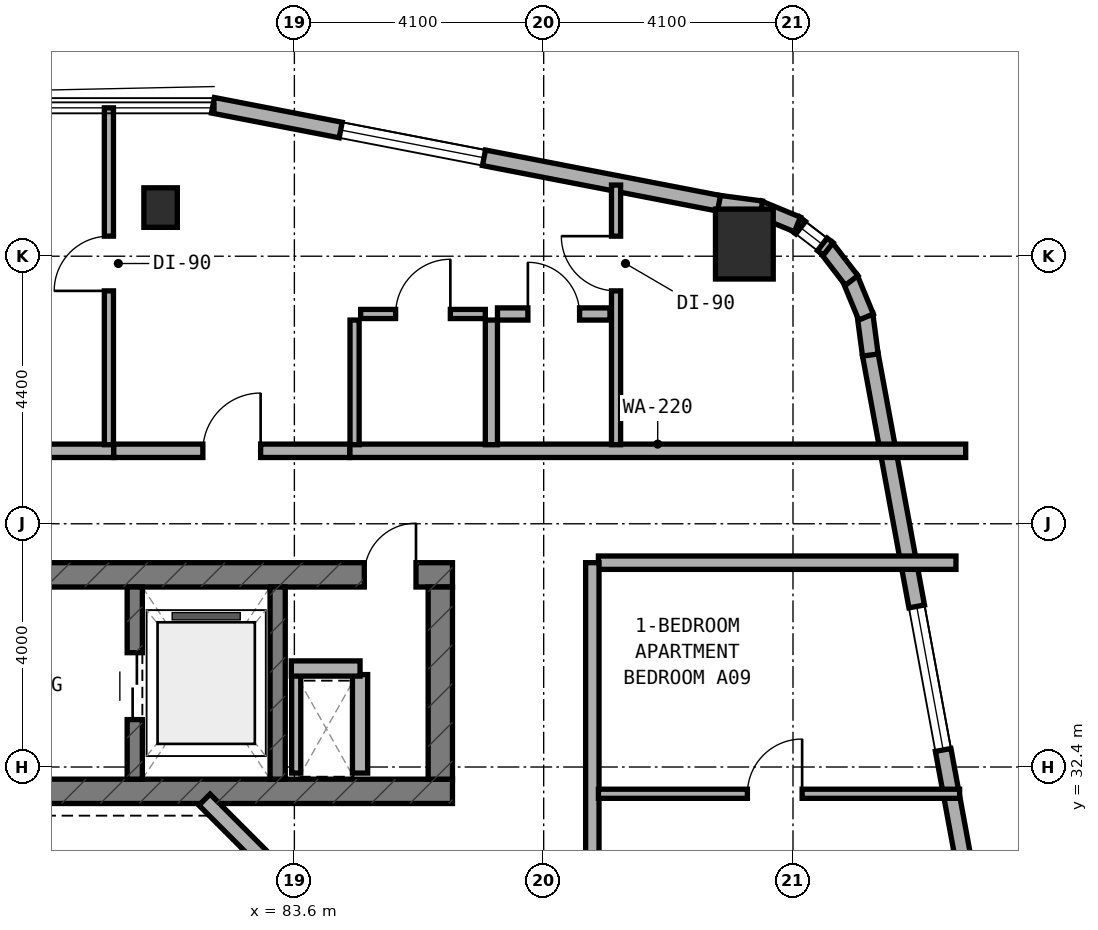
"""IFC4 building model, lengths in metres.
Left out: names, types, materials, properties, quantities, classifications, styles, units other than length and angle.
Written with IfcOpenShell. Run it as: python <this file> out.ifc"""

import sys

from ifc_helpers import new_model, si_unit, direction, frame, frame_2d, origin, origin_2d, place, context, subcontext, project, spatial, rectangle, extrude, element, fill, save


model = new_model("IFC4")
c1 = context("Model", 3, precision=1e-05, world=origin(), true_north=direction((0.0, 1.0)))
c2 = subcontext(c1, "Body", "Model", "MODEL_VIEW")
j1 = project(units=[si_unit("LENGTHUNIT", "METRE"), si_unit("PLANEANGLEUNIT", "RADIAN")], contexts=[c1])
p1 = place(None, origin())
s1 = spatial("IfcSite", under=j1, at=p1, CompositionType="ELEMENT")
p2 = place(p1, origin())
s2 = spatial("IfcBuilding", under=s1, at=p2, CompositionType="ELEMENT")
p3 = place(p2, frame((0.0, 0.0, 109.0)))
s3 = spatial("IfcBuildingStorey", under=s2, at=p3, CompositionType="ELEMENT", Elevation=109.0)
p4 = place(p3, frame((68.0, 32.0, 0.0), z_axis=(0.0, 0.0, 1.0), x_axis=(1.0, 0.0, 0.0)))
e1 = element("IfcWall", 1, at=p4, inside=s3, PredefinedType="SHEAR", context=c2, shape_type="SweptSolid", body=[
    extrude(rectangle(XDim=18.2, YDim=0.4, at=frame_2d((9.1, 0.0))), origin(), (0.0, 0.0, 1.0), 3.5),
])
p5 = place(p3, frame((68.0, 35.56, 0.0), z_axis=(0.0, 0.0, 1.0), x_axis=(1.0, 0.0, 0.0)))
e2 = element("IfcWall", 2, at=p5, inside=s3, PredefinedType="SHEAR", context=c2, shape_type="SweptSolid", body=[
    extrude(rectangle(XDim=18.2, YDim=0.4, at=frame_2d((9.1, 0.0))), origin(), (0.0, 0.0, 1.0), 3.5),
])
p6 = place(p5, frame((9.15, 0.0, 0.0)))
e3 = element("IfcOpeningElement", 3, at=p6, cuts=e2, PredefinedType="OPENING", context=c2, shape_type="SweptSolid", body=[
    extrude(rectangle(XDim=1.2, YDim=2.15, at=frame_2d((0.6, 1.075))), frame((0.0, 0.21, 0.0), z_axis=(0.0, -1.0, 0.0), x_axis=(1.0, 0.0, 0.0)), (0.0, 0.0, 1.0), 0.42),
])
p7 = place(p5, frame((16.75, 0.0, 0.0)))
e4 = element("IfcOpeningElement", 4, at=p7, cuts=e2, PredefinedType="OPENING", context=c2, shape_type="SweptSolid", body=[
    extrude(rectangle(XDim=0.85, YDim=2.1, at=frame_2d((0.425, 1.05))), frame((0.0, 0.21, 0.0), z_axis=(0.0, -1.0, 0.0), x_axis=(1.0, 0.0, 0.0)), (0.0, 0.0, 1.0), 0.42),
])
p8 = place(p3, frame((86.0, 32.2, 0.0), z_axis=(0.0, 0.0, 1.0), x_axis=(0.0, 1.0, 0.0)))
e5 = element("IfcWall", 5, at=p8, inside=s3, PredefinedType="SHEAR", context=c2, shape_type="SweptSolid", body=[
    extrude(rectangle(XDim=3.16, YDim=0.4, at=frame_2d((1.58, 0.0))), origin(), (0.0, 0.0, 1.0), 3.5),
])
p9 = place(p3, frame((80.975, 32.2, 0.0), z_axis=(0.0, 0.0, 1.0), x_axis=(0.0, 1.0, 0.0)))
e6 = element("IfcWall", 6, at=p9, inside=s3, PredefinedType="STANDARD", context=c2, shape_type="SweptSolid", body=[
    extrude(rectangle(XDim=3.16, YDim=0.25, at=frame_2d((1.58, 0.0))), origin(), (0.0, 0.0, 1.0), 3.25),
])
p10 = place(p9, frame((0.98, 0.0, 0.0)))
e7 = element("IfcOpeningElement", 7, at=p10, cuts=e6, PredefinedType="OPENING", context=c2, shape_type="SweptSolid", body=[
    extrude(rectangle(XDim=1.1, YDim=2.15, at=frame_2d((0.55, 1.075))), frame((0.0, 0.135, 0.0), z_axis=(0.0, -1.0, 0.0), x_axis=(1.0, 0.0, 0.0)), (0.0, 0.0, 1.0), 0.27),
])
p11 = place(p3, frame((83.325, 32.2, 0.0), z_axis=(0.0, 0.0, 1.0), x_axis=(0.0, 1.0, 0.0)))
e8 = element("IfcWall", 8, at=p11, inside=s3, PredefinedType="STANDARD", context=c2, shape_type="SweptSolid", body=[
    extrude(rectangle(XDim=3.16, YDim=0.25, at=frame_2d((1.58, 0.0))), origin(), (0.0, 0.0, 1.0), 3.25),
])
p12 = place(p3, frame((81.4, 41.6, 0.0), z_axis=(0.0, 0.0, 1.0), x_axis=(1.0, 0.0, 0.0)))
e9 = element("IfcColumn", 9, at=p12, inside=s3, PredefinedType="COLUMN", context=c2, shape_type="SweptSolid", body=[
    extrude(rectangle(XDim=0.55, YDim=0.65, at=origin_2d()), origin(), (0.0, 0.0, 1.0), 3.5),
])
p13 = place(p3, frame((91.0, 41.0, 0.0), z_axis=(0.0, 0.0, 1.0), x_axis=(1.0, 0.0, 0.0)))
e10 = element("IfcColumn", 10, at=p13, inside=s3, PredefinedType="COLUMN", context=c2, shape_type="SweptSolid", body=[
    extrude(rectangle(XDim=0.95, YDim=1.15, at=origin_2d()), origin(), (0.0, 0.0, 1.0), 3.5),
])
p14 = place(p3, frame((94.682, 30.442, 0.0), z_axis=(0.0, 0.0, 1.0), x_axis=(-0.181209963057, 0.983444431215, 0.0)))
e11 = element("IfcWall", 11, at=p14, inside=s3, PredefinedType="STANDARD", context=c2, shape_type="SweptSolid", body=[
    extrude(rectangle(XDim=8.889, YDim=0.26, at=frame_2d((4.445, 0.0))), origin(), (0.0, 0.0, 1.0), 3.25),
])
p15 = place(p14, frame((2.276, 0.0, 0.8)))
e12 = element("IfcOpeningElement", 12, at=p15, cuts=e11, PredefinedType="OPENING", context=c2, shape_type="SweptSolid", body=[
    extrude(rectangle(XDim=2.4, YDim=1.6, at=frame_2d((1.2, 0.8))), frame((0.0, 0.14, 0.0), z_axis=(0.0, -1.0, 0.0), x_axis=(1.0, 0.0, 0.0)), (0.0, 0.0, 1.0), 0.28),
])
p16 = place(p3, frame((93.072, 39.175, 0.0), z_axis=(0.0, 0.0, 1.0), x_axis=(-0.131667498923, 0.991293937098, 0.0)))
e13 = element("IfcWall", 13, at=p16, inside=s3, PredefinedType="STANDARD", context=c2, shape_type="SweptSolid", body=[
    extrude(rectangle(XDim=0.677, YDim=0.26, at=frame_2d((0.338, 0.0))), origin(), (0.0, 0.0, 1.0), 3.25),
])
p17 = place(p3, frame((93.001, 39.8, 0.0), z_axis=(0.0, 0.0, 1.0), x_axis=(-0.381988976935, 0.924166879681, 0.0)))
e14 = element("IfcWall", 14, at=p17, inside=s3, PredefinedType="STANDARD", context=c2, shape_type="SweptSolid", body=[
    extrude(rectangle(XDim=0.693, YDim=0.26, at=frame_2d((0.347, 0.0))), origin(), (0.0, 0.0, 1.0), 3.25),
])
p18 = place(p3, frame((92.764, 40.401, 0.0), z_axis=(0.0, 0.0, 1.0), x_axis=(-0.609472651958, 0.792807092876, 0.0)))
e15 = element("IfcWall", 15, at=p18, inside=s3, PredefinedType="STANDARD", context=c2, shape_type="SweptSolid", body=[
    extrude(rectangle(XDim=0.694, YDim=0.26, at=frame_2d((0.347, 0.0))), origin(), (0.0, 0.0, 1.0), 3.25),
])
p19 = place(p3, frame((92.379, 40.92, 0.0), z_axis=(0.0, 0.0, 1.0), x_axis=(-0.792506234191, 0.609863811657, 0.0)))
e16 = element("IfcWall", 16, at=p19, inside=s3, PredefinedType="STANDARD", context=c2, shape_type="SweptSolid", body=[
    extrude(rectangle(XDim=0.694, YDim=0.26, at=frame_2d((0.347, 0.0))), origin(), (0.0, 0.0, 1.0), 3.25),
])
p20 = place(p19, frame((0.122, 0.0, 0.85)))
e17 = element("IfcOpeningElement", 17, at=p20, cuts=e16, PredefinedType="OPENING", context=c2, shape_type="SweptSolid", body=[
    extrude(rectangle(XDim=0.45, YDim=1.5, at=frame_2d((0.225, 0.75))), frame((0.0, 0.14, 0.0), z_axis=(0.0, -1.0, 0.0), x_axis=(1.0, 0.0, 0.0)), (0.0, 0.0, 1.0), 0.28),
])
p21 = place(p3, frame((91.873, 41.322, 0.0), z_axis=(0.0, 0.0, 1.0), x_axis=(-0.92421822618, 0.381864727877, 0.0)))
e18 = element("IfcWall", 18, at=p21, inside=s3, PredefinedType="STANDARD", context=c2, shape_type="SweptSolid", body=[
    extrude(rectangle(XDim=0.694, YDim=0.26, at=frame_2d((0.347, 0.0))), origin(), (0.0, 0.0, 1.0), 3.25),
])
p22 = place(p3, frame((91.281, 41.579, 0.0), z_axis=(0.0, 0.0, 1.0), x_axis=(-0.991433279471, 0.130614135366, 0.0)))
e19 = element("IfcWall", 19, at=p22, inside=s3, PredefinedType="STANDARD", context=c2, shape_type="SweptSolid", body=[
    extrude(rectangle(XDim=0.712, YDim=0.26, at=frame_2d((0.356, 0.0))), origin(), (0.0, 0.0, 1.0), 3.25),
])
p23 = place(p3, frame((90.583, 41.67, 0.0), z_axis=(0.0, 0.0, 1.0), x_axis=(-0.981750199588, 0.190175039396, 0.0)))
e20 = element("IfcWall", 20, at=p23, inside=s3, PredefinedType="STANDARD", context=c2, shape_type="SweptSolid", body=[
    extrude(rectangle(XDim=8.477, YDim=0.26, at=frame_2d((4.238, 0.0))), origin(), (0.0, 0.0, 1.0), 3.25),
])
p24 = place(p23, frame((3.937, 0.0, 0.8)))
e21 = element("IfcOpeningElement", 21, at=p24, cuts=e20, PredefinedType="OPENING", context=c2, shape_type="SweptSolid", body=[
    extrude(rectangle(XDim=2.4, YDim=1.6, at=frame_2d((1.2, 0.8))), frame((0.0, 0.14, 0.0), z_axis=(0.0, -1.0, 0.0), x_axis=(1.0, 0.0, 0.0)), (0.0, 0.0, 1.0), 0.28),
])
p25 = place(p3, frame((83.756, 30.228, 0.0), z_axis=(0.0, 0.0, 1.0), x_axis=(-0.707106781187, 0.707106781187, 0.0)))
e22 = element("IfcWall", 22, at=p25, inside=s3, PredefinedType="STANDARD", context=c2, shape_type="SweptSolid", body=[
    extrude(rectangle(XDim=2.311, YDim=0.26, at=frame_2d((1.155, 0.0))), origin(), (0.0, 0.0, 1.0), 3.25),
])
p26 = place(p3, frame((83.63, 32.3, 0.0), z_axis=(0.0, 0.0, 1.0), x_axis=(0.0, 1.0, 0.0)))
e23 = element("IfcWall", 23, at=p26, inside=s3, PredefinedType="PARTITIONING", context=c2, shape_type="SweptSolid", body=[
    extrude(rectangle(XDim=1.62, YDim=0.15, at=frame_2d((0.81, 0.0))), origin(), (0.0, 0.0, 1.0), 2.825),
])
p27 = place(p3, frame((84.68, 32.3, 0.0), z_axis=(0.0, 0.0, 1.0), x_axis=(0.0, 1.0, 0.0)))
e24 = element("IfcWall", 24, at=p27, inside=s3, PredefinedType="SOLIDWALL", context=c2, shape_type="SweptSolid", body=[
    extrude(rectangle(XDim=1.62, YDim=0.25, at=frame_2d((0.81, 0.0))), origin(), (0.0, 0.0, 1.0), 3.22),
])
p28 = place(p3, frame((83.55, 34.02, 0.0), z_axis=(0.0, 0.0, 1.0), x_axis=(1.0, 0.0, 0.0)))
e25 = element("IfcWall", 25, at=p28, inside=s3, PredefinedType="SOLIDWALL", context=c2, shape_type="SweptSolid", body=[
    extrude(rectangle(XDim=1.13, YDim=0.25, at=frame_2d((0.565, 0.0))), origin(), (0.0, 0.0, 1.0), 3.22),
])
p29 = place(p3, frame((74.8, 37.6, 0.0), z_axis=(0.0, 0.0, 1.0), x_axis=(1.0, 0.0, 0.0)))
e26 = element("IfcWall", 26, at=p29, inside=s3, PredefinedType="SOLIDWALL", context=c2, shape_type="SweptSolid", body=[
    extrude(rectangle(XDim=5.83, YDim=0.22, at=frame_2d((2.915, 0.0))), origin(), (0.0, 0.0, 1.0), 3.22),
])
p30 = place(p3, frame((84.51, 37.6, 0.0), z_axis=(0.0, 0.0, 1.0), x_axis=(1.0, 0.0, 0.0)))
e27 = element("IfcWall", 27, at=p30, inside=s3, PredefinedType="SOLIDWALL", context=c2, shape_type="SweptSolid", body=[
    extrude(rectangle(XDim=10.13, YDim=0.22, at=frame_2d((5.065, 0.0))), origin(), (0.0, 0.0, 1.0), 2.945),
])
p31 = place(p3, frame((80.63, 37.6, 0.0), z_axis=(0.0, 0.0, 1.0), x_axis=(1.0, 0.0, 0.0)))
e28 = element("IfcWall", 28, at=p31, inside=s3, PredefinedType="SOLIDWALL", context=c2, shape_type="SweptSolid", body=[
    extrude(rectangle(XDim=3.88, YDim=0.22, at=frame_2d((1.94, 0.0))), origin(), (0.0, 0.0, 1.0), 2.825),
])
p32 = place(p31, frame((1.465, 0.0, 0.0)))
e29 = element("IfcOpeningElement", 29, at=p32, cuts=e28, PredefinedType="OPENING", context=c2, shape_type="SweptSolid", body=[
    extrude(rectangle(XDim=0.95, YDim=2.1, at=frame_2d((0.475, 1.05))), frame((0.0, 0.12, 0.0), z_axis=(0.0, -1.0, 0.0), x_axis=(1.0, 0.0, 0.0)), (0.0, 0.0, 1.0), 0.24),
])
p33 = place(p3, frame((80.55, 37.7, 0.0), z_axis=(0.0, 0.0, 1.0), x_axis=(0.0, 1.0, 0.0)))
e30 = element("IfcWall", 30, at=p33, inside=s3, PredefinedType="PARTITIONING", context=c2, shape_type="SweptSolid", body=[
    extrude(rectangle(XDim=5.54, YDim=0.15, at=frame_2d((2.77, 0.0))), origin(), (0.0, 0.0, 1.0), 2.865),
])
p34 = place(p33, frame((2.53, 0.0, 0.0)))
e31 = element("IfcOpeningElement", 31, at=p34, cuts=e30, PredefinedType="OPENING", context=c2, shape_type="SweptSolid", body=[
    extrude(rectangle(XDim=0.9, YDim=2.1, at=frame_2d((0.45, 1.05))), frame((0.0, 0.085, 0.0), z_axis=(0.0, -1.0, 0.0), x_axis=(1.0, 0.0, 0.0)), (0.0, 0.0, 1.0), 0.17),
])
p35 = place(p3, frame((88.89, 37.7, 0.0), z_axis=(0.0, 0.0, 1.0), x_axis=(0.0, 1.0, 0.0)))
e32 = element("IfcWall", 32, at=p35, inside=s3, PredefinedType="PARTITIONING", context=c2, shape_type="SweptSolid", body=[
    extrude(rectangle(XDim=4.27, YDim=0.15, at=frame_2d((2.135, 0.0))), origin(), (0.0, 0.0, 1.0), 2.945),
])
p36 = place(p35, frame((2.53, 0.0, 0.0)))
e33 = element("IfcOpeningElement", 33, at=p36, cuts=e32, PredefinedType="OPENING", context=c2, shape_type="SweptSolid", body=[
    extrude(rectangle(XDim=0.9, YDim=2.1, at=frame_2d((0.45, 1.05))), frame((0.0, 0.085, 0.0), z_axis=(0.0, -1.0, 0.0), x_axis=(1.0, 0.0, 0.0)), (0.0, 0.0, 1.0), 0.17),
])
p37 = place(p3, frame((86.84, 37.7, 0.0), z_axis=(0.0, 0.0, 1.0), x_axis=(0.0, 1.0, 0.0)))
e34 = element("IfcWall", 34, at=p37, inside=s3, PredefinedType="PLUMBINGWALL", context=c2, shape_type="SweptSolid", body=[
    extrude(rectangle(XDim=2.05, YDim=0.2, at=frame_2d((1.025, 0.0))), origin(), (0.0, 0.0, 1.0), 3.22),
])
p38 = place(p3, frame((84.59, 37.7, 0.0), z_axis=(0.0, 0.0, 1.0), x_axis=(0.0, 1.0, 0.0)))
e35 = element("IfcWall", 35, at=p38, inside=s3, PredefinedType="PARTITIONING", context=c2, shape_type="SweptSolid", body=[
    extrude(rectangle(XDim=2.05, YDim=0.15, at=frame_2d((1.025, 0.0))), origin(), (0.0, 0.0, 1.0), 3.22),
])
p39 = place(p3, frame((86.94, 39.85, 0.0), z_axis=(0.0, 0.0, 1.0), x_axis=(1.0, 0.0, 0.0)))
e36 = element("IfcWall", 36, at=p39, inside=s3, PredefinedType="PLUMBINGWALL", context=c2, shape_type="SweptSolid", body=[
    extrude(rectangle(XDim=1.85, YDim=0.2, at=frame_2d((0.925, 0.0))), origin(), (0.0, 0.0, 1.0), 3.22),
])
p40 = place(p39, frame((0.5, 0.0, 0.0)))
e37 = element("IfcOpeningElement", 37, at=p40, cuts=e36, PredefinedType="OPENING", context=c2, shape_type="SweptSolid", body=[
    extrude(rectangle(XDim=0.85, YDim=2.1, at=frame_2d((0.425, 1.05))), frame((0.0, 0.11, 0.0), z_axis=(0.0, -1.0, 0.0), x_axis=(1.0, 0.0, 0.0)), (0.0, 0.0, 1.0), 0.22),
])
p41 = place(p3, frame((84.69, 39.85, 0.0), z_axis=(0.0, 0.0, 1.0), x_axis=(1.0, 0.0, 0.0)))
e38 = element("IfcWall", 38, at=p41, inside=s3, PredefinedType="PARTITIONING", context=c2, shape_type="SweptSolid", body=[
    extrude(rectangle(XDim=2.05, YDim=0.15, at=frame_2d((1.025, 0.0))), origin(), (0.0, 0.0, 1.0), 3.22),
])
p42 = place(p41, frame((0.575, 0.0, 0.0)))
e39 = element("IfcOpeningElement", 39, at=p42, cuts=e38, PredefinedType="OPENING", context=c2, shape_type="SweptSolid", body=[
    extrude(rectangle(XDim=0.9, YDim=2.1, at=frame_2d((0.45, 1.05))), frame((0.0, 0.085, 0.0), z_axis=(0.0, -1.0, 0.0), x_axis=(1.0, 0.0, 0.0)), (0.0, 0.0, 1.0), 0.17),
])
p43 = place(p3, frame((88.6, 35.76, 0.0), z_axis=(0.0, 0.0, 1.0), x_axis=(1.0, 0.0, 0.0)))
e40 = element("IfcWall", 40, at=p43, inside=s3, PredefinedType="SOLIDWALL", context=c2, shape_type="SweptSolid", body=[
    extrude(rectangle(XDim=5.88, YDim=0.22, at=frame_2d((2.94, 0.0))), origin(), (0.0, 0.0, 1.0), 2.945),
])
p44 = place(p3, frame((88.5, 26.4, 0.0), z_axis=(0.0, 0.0, 1.0), x_axis=(0.0, 1.0, 0.0)))
e41 = element("IfcWall", 41, at=p44, inside=s3, PredefinedType="SOLIDWALL", context=c2, shape_type="SweptSolid", body=[
    extrude(rectangle(XDim=9.36, YDim=0.22, at=frame_2d((4.68, 0.0))), origin(), (0.0, 0.0, 1.0), 2.825),
])
p45 = place(p44, frame((2.305, 0.0, 0.0)))
e42 = element("IfcOpeningElement", 42, at=p45, cuts=e41, PredefinedType="OPENING", context=c2, shape_type="SweptSolid", body=[
    extrude(rectangle(XDim=0.95, YDim=2.1, at=frame_2d((0.475, 1.05))), frame((0.0, 0.12, 0.0), z_axis=(0.0, -1.0, 0.0), x_axis=(1.0, 0.0, 0.0)), (0.0, 0.0, 1.0), 0.24),
])
p46 = place(p3, frame((88.6, 31.96, 0.0), z_axis=(0.0, 0.0, 1.0), x_axis=(1.0, 0.0, 0.0)))
e43 = element("IfcWall", 43, at=p46, inside=s3, PredefinedType="PARTITIONING", context=c2, shape_type="SweptSolid", body=[
    extrude(rectangle(XDim=5.94, YDim=0.15, at=frame_2d((2.97, 0.0))), origin(), (0.0, 0.0, 1.0), 2.945),
])
p47 = place(p46, frame((2.45, 0.0, 0.0)))
e44 = element("IfcOpeningElement", 44, at=p47, cuts=e43, PredefinedType="OPENING", context=c2, shape_type="SweptSolid", body=[
    extrude(rectangle(XDim=0.9, YDim=2.1, at=frame_2d((0.45, 1.05))), frame((0.0, 0.085, 0.0), z_axis=(0.0, -1.0, 0.0), x_axis=(1.0, 0.0, 0.0)), (0.0, 0.0, 1.0), 0.17),
])
p48 = place(p15, origin())
e45 = element("IfcWindow", 45, at=p48, inside=s3, PartitioningType="SINGLE_PANEL", PredefinedType="WINDOW", context=c2, shape_type="SweptSolid", body=[
    extrude(rectangle(XDim=2.4, YDim=1.6, at=frame_2d((1.2, 0.8))), frame((0.0, 0.03, 0.0), z_axis=(0.0, -1.0, 0.0), x_axis=(1.0, 0.0, 0.0)), (0.0, 0.0, 1.0), 0.06),
])
fill(e12, e45)
p49 = place(p24, origin())
e46 = element("IfcWindow", 46, at=p49, inside=s3, PartitioningType="SINGLE_PANEL", PredefinedType="WINDOW", context=c2, shape_type="SweptSolid", body=[
    extrude(rectangle(XDim=2.4, YDim=1.6, at=frame_2d((1.2, 0.8))), frame((0.0, 0.03, 0.0), z_axis=(0.0, -1.0, 0.0), x_axis=(1.0, 0.0, 0.0)), (0.0, 0.0, 1.0), 0.06),
])
fill(e21, e46)
p50 = place(p20, origin())
e47 = element("IfcWindow", 47, at=p50, inside=s3, PartitioningType="SINGLE_PANEL", PredefinedType="WINDOW", context=c2, shape_type="SweptSolid", body=[
    extrude(rectangle(XDim=0.45, YDim=1.5, at=frame_2d((0.225, 0.75))), frame((0.0, 0.03, 0.0), z_axis=(0.0, -1.0, 0.0), x_axis=(1.0, 0.0, 0.0)), (0.0, 0.0, 1.0), 0.06),
])
fill(e17, e47)
p51 = place(p10, origin())
e48 = element("IfcDoor", 48, at=p51, inside=s3, OperationType="DOUBLE_DOOR_SLIDING", PredefinedType="DOOR", context=c2, shape_type="SweptSolid", body=[
    extrude(rectangle(XDim=1.1, YDim=2.15, at=frame_2d((0.55, 1.075))), frame((0.0, 0.025, 0.0), z_axis=(0.0, -1.0, 0.0), x_axis=(1.0, 0.0, 0.0)), (0.0, 0.0, 1.0), 0.05),
])
fill(e7, e48)
p52 = place(p7, origin())
e49 = element("IfcDoor", 49, at=p52, inside=s3, OperationType="SINGLE_SWING_RIGHT", PredefinedType="DOOR", context=c2, shape_type="SweptSolid", body=[
    extrude(rectangle(XDim=0.85, YDim=2.1, at=frame_2d((0.425, 1.05))), frame((0.0, 0.025, 0.0), z_axis=(0.0, -1.0, 0.0), x_axis=(1.0, 0.0, 0.0)), (0.0, 0.0, 1.0), 0.05),
])
fill(e4, e49)
p53 = place(p32, origin())
e50 = element("IfcDoor", 50, at=p53, inside=s3, OperationType="SINGLE_SWING_RIGHT", PredefinedType="DOOR", context=c2, shape_type="SweptSolid", body=[
    extrude(rectangle(XDim=0.95, YDim=2.1, at=frame_2d((0.475, 1.05))), frame((0.0, 0.025, 0.0), z_axis=(0.0, -1.0, 0.0), x_axis=(1.0, 0.0, 0.0)), (0.0, 0.0, 1.0), 0.05),
])
fill(e29, e50)
p54 = place(p34, origin())
e51 = element("IfcDoor", 51, at=p54, inside=s3, OperationType="SINGLE_SWING_LEFT", PredefinedType="DOOR", context=c2, shape_type="SweptSolid", body=[
    extrude(rectangle(XDim=0.9, YDim=2.1, at=frame_2d((0.45, 1.05))), frame((0.0, 0.025, 0.0), z_axis=(0.0, -1.0, 0.0), x_axis=(1.0, 0.0, 0.0)), (0.0, 0.0, 1.0), 0.05),
])
fill(e31, e51)
p55 = place(p36, origin())
e52 = element("IfcDoor", 52, at=p55, inside=s3, OperationType="SINGLE_SWING_RIGHT", PredefinedType="DOOR", context=c2, shape_type="SweptSolid", body=[
    extrude(rectangle(XDim=0.9, YDim=2.1, at=frame_2d((0.45, 1.05))), frame((0.0, 0.025, 0.0), z_axis=(0.0, -1.0, 0.0), x_axis=(1.0, 0.0, 0.0)), (0.0, 0.0, 1.0), 0.05),
])
fill(e33, e52)
p56 = place(p40, origin())
e53 = element("IfcDoor", 53, at=p56, inside=s3, OperationType="SINGLE_SWING_LEFT", PredefinedType="DOOR", context=c2, shape_type="SweptSolid", body=[
    extrude(rectangle(XDim=0.85, YDim=2.1, at=frame_2d((0.425, 1.05))), frame((0.0, 0.025, 0.0), z_axis=(0.0, -1.0, 0.0), x_axis=(1.0, 0.0, 0.0)), (0.0, 0.0, 1.0), 0.05),
])
fill(e37, e53)
p57 = place(p42, origin())
e54 = element("IfcDoor", 54, at=p57, inside=s3, OperationType="SINGLE_SWING_RIGHT", PredefinedType="DOOR", context=c2, shape_type="SweptSolid", body=[
    extrude(rectangle(XDim=0.9, YDim=2.1, at=frame_2d((0.45, 1.05))), frame((0.0, 0.025, 0.0), z_axis=(0.0, -1.0, 0.0), x_axis=(1.0, 0.0, 0.0)), (0.0, 0.0, 1.0), 0.05),
])
fill(e39, e54)
p58 = place(p47, origin())
e55 = element("IfcDoor", 55, at=p58, inside=s3, OperationType="SINGLE_SWING_RIGHT", PredefinedType="DOOR", context=c2, shape_type="SweptSolid", body=[
    extrude(rectangle(XDim=0.9, YDim=2.1, at=frame_2d((0.45, 1.05))), frame((0.0, 0.025, 0.0), z_axis=(0.0, -1.0, 0.0), x_axis=(1.0, 0.0, 0.0)), (0.0, 0.0, 1.0), 0.05),
])
fill(e44, e55)
save(model, sys.argv[1])
